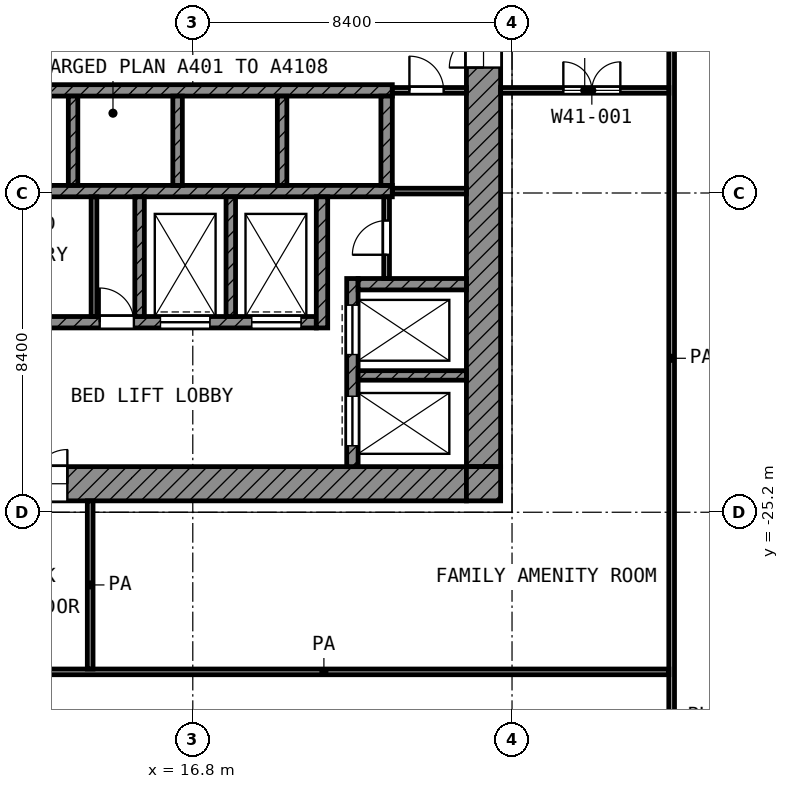
"""IFC4 building model, lengths in metres.
Left out: names, types, materials, properties, quantities, classifications, styles, units other than length and angle.
Written with IfcOpenShell. Run it as: python <this file> out.ifc"""

import sys

from ifc_helpers import new_model, si_unit, direction, frame, frame_2d, origin, place, context, subcontext, project, spatial, rectangle, extrude, element, fill, save


model = new_model("IFC4")
c1 = context("Model", 3, precision=1e-05, world=origin(), true_north=direction((0.0, 1.0)))
c2 = subcontext(c1, "Body", "Model", "MODEL_VIEW")
j1 = project(units=[si_unit("LENGTHUNIT", "METRE"), si_unit("PLANEANGLEUNIT", "RADIAN")], contexts=[c1])
p1 = place(None, origin())
s1 = spatial("IfcSite", under=j1, at=p1, CompositionType="ELEMENT")
p2 = place(p1, origin())
s2 = spatial("IfcBuilding", under=s1, at=p2, CompositionType="ELEMENT")
p3 = place(p2, frame((0.0, 0.0, 179.4)))
s3 = spatial("IfcBuildingStorey", under=s2, at=p3, CompositionType="ELEMENT", Elevation=179.4)
p4 = place(p3, frame((24.45, -24.0, 0.0), z_axis=(0.0, 0.0, 1.0), x_axis=(0.0, 1.0, 0.0)))
e1 = element("IfcWall", 1, at=p4, inside=s3, PredefinedType="SHEAR", context=c2, shape_type="SweptSolid", body=[
    extrude(rectangle(XDim=18.6, YDim=0.9, at=frame_2d((9.3, 0.0))), origin(), (0.0, 0.0, 1.0), 3.6),
])
p5 = place(p4, frame((10.5, 0.0, 0.0)))
e2 = element("IfcOpeningElement", 2, at=p5, cuts=e1, PredefinedType="OPENING", context=c2, shape_type="SweptSolid", body=[
    extrude(rectangle(XDim=1.8, YDim=2.1, at=frame_2d((0.9, 1.05))), frame((0.0, 0.46, 0.0), z_axis=(0.0, -1.0, 0.0), x_axis=(1.0, 0.0, 0.0)), (0.0, 0.0, 1.0), 0.92),
])
p6 = place(p3, frame((5.4, -24.45, 0.0), z_axis=(0.0, 0.0, 1.0), x_axis=(1.0, 0.0, 0.0)))
e3 = element("IfcWall", 3, at=p6, inside=s3, PredefinedType="SHEAR", context=c2, shape_type="SweptSolid", body=[
    extrude(rectangle(XDim=18.6, YDim=0.9, at=frame_2d((9.3, 0.0))), origin(), (0.0, 0.0, 1.0), 3.6),
])
p7 = place(p6, frame((6.3, 0.0, 0.0)))
e4 = element("IfcOpeningElement", 4, at=p7, cuts=e3, PredefinedType="OPENING", context=c2, shape_type="SweptSolid", body=[
    extrude(rectangle(XDim=1.8, YDim=2.1, at=frame_2d((0.9, 1.05))), frame((0.0, 0.46, 0.0), z_axis=(0.0, -1.0, 0.0), x_axis=(1.0, 0.0, 0.0)), (0.0, 0.0, 1.0), 0.92),
])
p8 = place(p3, frame((24.45, -24.9, 0.0), z_axis=(0.0, 0.0, 1.0), x_axis=(0.0, 1.0, 0.0)))
e5 = element("IfcWall", 5, at=p8, inside=s3, PredefinedType="SHEAR", context=c2, shape_type="SweptSolid", body=[
    extrude(rectangle(XDim=0.9, YDim=0.9, at=frame_2d((0.45, 0.0))), origin(), (0.0, 0.0, 1.0), 3.6),
])
p9 = place(p3, frame((5.4, -14.1, 0.0), z_axis=(0.0, 0.0, 1.0), x_axis=(1.0, 0.0, 0.0)))
e6 = element("IfcWall", 6, at=p9, inside=s3, PredefinedType="SHEAR", context=c2, shape_type="SweptSolid", body=[
    extrude(rectangle(XDim=16.65, YDim=0.3, at=frame_2d((8.325, 0.0))), origin(), (0.0, 0.0, 1.0), 3.6),
])
p10 = place(p9, frame((0.825, 0.0, 0.0)))
e7 = element("IfcOpeningElement", 7, at=p10, cuts=e6, PredefinedType="OPENING", context=c2, shape_type="SweptSolid", body=[
    extrude(rectangle(XDim=1.1, YDim=2.1, at=frame_2d((0.55, 1.05))), frame((0.0, 0.16, 0.0), z_axis=(0.0, -1.0, 0.0), x_axis=(1.0, 0.0, 0.0)), (0.0, 0.0, 1.0), 0.32),
])
p11 = place(p9, frame((3.575, 0.0, 0.0)))
e8 = element("IfcOpeningElement", 8, at=p11, cuts=e6, PredefinedType="OPENING", context=c2, shape_type="SweptSolid", body=[
    extrude(rectangle(XDim=1.1, YDim=2.1, at=frame_2d((0.55, 1.05))), frame((0.0, 0.16, 0.0), z_axis=(0.0, -1.0, 0.0), x_axis=(1.0, 0.0, 0.0)), (0.0, 0.0, 1.0), 0.32),
])
p12 = place(p3, frame((5.4, -16.75, 0.0), z_axis=(0.0, 0.0, 1.0), x_axis=(1.0, 0.0, 0.0)))
e9 = element("IfcWall", 9, at=p12, inside=s3, PredefinedType="SHEAR", context=c2, shape_type="SweptSolid", body=[
    extrude(rectangle(XDim=16.65, YDim=0.3, at=frame_2d((8.325, 0.0))), origin(), (0.0, 0.0, 1.0), 3.6),
])
p13 = place(p3, frame((5.4, -20.2, 0.0), z_axis=(0.0, 0.0, 1.0), x_axis=(1.0, 0.0, 0.0)))
e10 = element("IfcWall", 10, at=p13, inside=s3, PredefinedType="SHEAR", context=c2, shape_type="SweptSolid", body=[
    extrude(rectangle(XDim=14.65, YDim=0.3, at=frame_2d((7.325, 0.0))), origin(), (0.0, 0.0, 1.0), 3.6),
])
p14 = place(p13, frame((10.55, 0.0, 0.0)))
e11 = element("IfcOpeningElement", 11, at=p14, cuts=e10, PredefinedType="OPENING", context=c2, shape_type="SweptSolid", body=[
    extrude(rectangle(XDim=1.3, YDim=2.1, at=frame_2d((0.65, 1.05))), frame((0.0, 0.16, 0.0), z_axis=(0.0, -1.0, 0.0), x_axis=(1.0, 0.0, 0.0)), (0.0, 0.0, 1.0), 0.32),
])
p15 = place(p13, frame((12.95, 0.0, 0.0)))
e12 = element("IfcOpeningElement", 12, at=p15, cuts=e10, PredefinedType="OPENING", context=c2, shape_type="SweptSolid", body=[
    extrude(rectangle(XDim=1.3, YDim=2.1, at=frame_2d((0.65, 1.05))), frame((0.0, 0.16, 0.0), z_axis=(0.0, -1.0, 0.0), x_axis=(1.0, 0.0, 0.0)), (0.0, 0.0, 1.0), 0.32),
])
p16 = place(p13, frame((0.55, 0.0, 0.0)))
e13 = element("IfcOpeningElement", 13, at=p16, cuts=e10, PredefinedType="OPENING", context=c2, shape_type="SweptSolid", body=[
    extrude(rectangle(XDim=1.3, YDim=2.1, at=frame_2d((0.65, 1.05))), frame((0.0, 0.16, 0.0), z_axis=(0.0, -1.0, 0.0), x_axis=(1.0, 0.0, 0.0)), (0.0, 0.0, 1.0), 0.32),
])
p17 = place(p13, frame((2.95, 0.0, 0.0)))
e14 = element("IfcOpeningElement", 14, at=p17, cuts=e10, PredefinedType="OPENING", context=c2, shape_type="SweptSolid", body=[
    extrude(rectangle(XDim=1.3, YDim=2.1, at=frame_2d((0.65, 1.05))), frame((0.0, 0.16, 0.0), z_axis=(0.0, -1.0, 0.0), x_axis=(1.0, 0.0, 0.0)), (0.0, 0.0, 1.0), 0.32),
])
p18 = place(p13, frame((6.55, 0.0, 0.0)))
e15 = element("IfcOpeningElement", 15, at=p18, cuts=e10, PredefinedType="OPENING", context=c2, shape_type="SweptSolid", body=[
    extrude(rectangle(XDim=0.9, YDim=2.1, at=frame_2d((0.45, 1.05))), frame((0.0, 0.16, 0.0), z_axis=(0.0, -1.0, 0.0), x_axis=(1.0, 0.0, 0.0)), (0.0, 0.0, 1.0), 0.32),
])
p19 = place(p13, frame((8.95, 0.0, 0.0)))
e16 = element("IfcOpeningElement", 16, at=p19, cuts=e10, PredefinedType="OPENING", context=c2, shape_type="SweptSolid", body=[
    extrude(rectangle(XDim=0.9, YDim=2.1, at=frame_2d((0.45, 1.05))), frame((0.0, 0.16, 0.0), z_axis=(0.0, -1.0, 0.0), x_axis=(1.0, 0.0, 0.0)), (0.0, 0.0, 1.0), 0.32),
])
p20 = place(p3, frame((20.2, -20.35, 0.0), z_axis=(0.0, 0.0, 1.0), x_axis=(0.0, 1.0, 0.0)))
e17 = element("IfcWall", 17, at=p20, inside=s3, PredefinedType="SHEAR", context=c2, shape_type="SweptSolid", body=[
    extrude(rectangle(XDim=3.45, YDim=0.3, at=frame_2d((1.725, 0.0))), origin(), (0.0, 0.0, 1.0), 3.6),
])
p21 = place(p3, frame((21.9, -16.6, 0.0), z_axis=(0.0, 0.0, 1.0), x_axis=(0.0, 1.0, 0.0)))
e18 = element("IfcWall", 18, at=p21, inside=s3, PredefinedType="SHEAR", context=c2, shape_type="SweptSolid", body=[
    extrude(rectangle(XDim=2.35, YDim=0.3, at=frame_2d((1.175, 0.0))), origin(), (0.0, 0.0, 1.0), 3.6),
])
p22 = place(p3, frame((21.15, -19.2, 0.0), z_axis=(0.0, 0.0, 1.0), x_axis=(1.0, 0.0, 0.0)))
e19 = element("IfcWall", 19, at=p22, inside=s3, PredefinedType="SHEAR", context=c2, shape_type="SweptSolid", body=[
    extrude(rectangle(XDim=2.85, YDim=0.3, at=frame_2d((1.425, 0.0))), origin(), (0.0, 0.0, 1.0), 3.6),
])
p23 = place(p3, frame((21.0, -24.0, 0.0), z_axis=(0.0, 0.0, 1.0), x_axis=(0.0, 1.0, 0.0)))
e20 = element("IfcWall", 20, at=p23, inside=s3, PredefinedType="SHEAR", context=c2, shape_type="SweptSolid", body=[
    extrude(rectangle(XDim=4.95, YDim=0.3, at=frame_2d((2.475, 0.0))), origin(), (0.0, 0.0, 1.0), 3.6),
])
p24 = place(p23, frame((2.95, 0.0, 0.0)))
e21 = element("IfcOpeningElement", 21, at=p24, cuts=e20, PredefinedType="OPENING", context=c2, shape_type="SweptSolid", body=[
    extrude(rectangle(XDim=1.3, YDim=2.1, at=frame_2d((0.65, 1.05))), frame((0.0, 0.16, 0.0), z_axis=(0.0, -1.0, 0.0), x_axis=(1.0, 0.0, 0.0)), (0.0, 0.0, 1.0), 0.32),
])
p25 = place(p23, frame((0.55, 0.0, 0.0)))
e22 = element("IfcOpeningElement", 22, at=p25, cuts=e20, PredefinedType="OPENING", context=c2, shape_type="SweptSolid", body=[
    extrude(rectangle(XDim=1.3, YDim=2.1, at=frame_2d((0.65, 1.05))), frame((0.0, 0.16, 0.0), z_axis=(0.0, -1.0, 0.0), x_axis=(1.0, 0.0, 0.0)), (0.0, 0.0, 1.0), 0.32),
])
p26 = place(p3, frame((21.15, -21.6, 0.0), z_axis=(0.0, 0.0, 1.0), x_axis=(1.0, 0.0, 0.0)))
e23 = element("IfcWall", 23, at=p26, inside=s3, PredefinedType="SHEAR", context=c2, shape_type="SweptSolid", body=[
    extrude(rectangle(XDim=2.85, YDim=0.25, at=frame_2d((1.425, 0.0))), origin(), (0.0, 0.0, 1.0), 3.6),
])
for number, where, z_axis, x_axis in (
    (24, (15.4, -20.05, 0.0), (0.0, 0.0, 1.0), (0.0, 1.0, 0.0)),
    (25, (17.8, -20.05, 0.0), (0.0, 0.0, 1.0), (0.0, 1.0, 0.0)),
):
    element("IfcWall", number, at=place(p3, frame(where, z_axis=z_axis, x_axis=x_axis)), inside=s3, PredefinedType="SHEAR", context=c2, shape_type="SweptSolid", body=[
        extrude(rectangle(XDim=3.15, YDim=0.25, at=frame_2d((1.575, 0.0))), origin(), (0.0, 0.0, 1.0), 3.6),
    ])
for number, where, z_axis, x_axis in (
    (26, (13.65, -16.6, 0.0), (0.0, 0.0, 1.0), (0.0, 1.0, 0.0)),
    (27, (16.4, -16.6, 0.0), (0.0, 0.0, 1.0), (0.0, 1.0, 0.0)),
    (28, (19.15, -16.6, 0.0), (0.0, 0.0, 1.0), (0.0, 1.0, 0.0)),
):
    element("IfcWall", number, at=place(p3, frame(where, z_axis=z_axis, x_axis=x_axis)), inside=s3, PredefinedType="SHEAR", context=c2, shape_type="SweptSolid", body=[
        extrude(rectangle(XDim=2.35, YDim=0.25, at=frame_2d((1.175, 0.0))), origin(), (0.0, 0.0, 1.0), 3.6),
    ])
p27 = place(p3, frame((21.9, -19.05, 0.0), z_axis=(0.0, 0.0, 1.0), x_axis=(0.0, 1.0, 0.0)))
e29 = element("IfcWall", 29, at=p27, inside=s3, PredefinedType="PARTITIONING", context=c2, shape_type="SweptSolid", body=[
    extrude(rectangle(XDim=2.15, YDim=0.15, at=frame_2d((1.075, 0.0))), origin(), (0.0, 0.0, 1.0), 3.6),
])
p28 = place(p27, frame((0.625, 0.0, 0.0)))
e30 = element("IfcOpeningElement", 30, at=p28, cuts=e29, PredefinedType="OPENING", context=c2, shape_type="SweptSolid", body=[
    extrude(rectangle(XDim=0.9, YDim=2.1, at=frame_2d((0.45, 1.05))), frame((0.0, 0.085, 0.0), z_axis=(0.0, -1.0, 0.0), x_axis=(1.0, 0.0, 0.0)), (0.0, 0.0, 1.0), 0.17),
])
p29 = place(p3, frame((22.05, -16.75, 0.0), z_axis=(0.0, 0.0, 1.0), x_axis=(1.0, 0.0, 0.0)))
e31 = element("IfcWall", 31, at=p29, inside=s3, PredefinedType="PARTITIONING", context=c2, shape_type="SweptSolid", body=[
    extrude(rectangle(XDim=1.95, YDim=0.15, at=frame_2d((0.975, 0.0))), origin(), (0.0, 0.0, 1.0), 3.6),
])
p30 = place(p3, frame((22.05, -14.1, 0.0), z_axis=(0.0, 0.0, 1.0), x_axis=(1.0, 0.0, 0.0)))
e32 = element("IfcWall", 32, at=p30, inside=s3, PredefinedType="PARTITIONING", context=c2, shape_type="SweptSolid", body=[
    extrude(rectangle(XDim=1.95, YDim=0.15, at=frame_2d((0.975, 0.0))), origin(), (0.0, 0.0, 1.0), 3.6),
])
p31 = place(p30, frame((0.45, 0.0, 0.0)))
e33 = element("IfcOpeningElement", 33, at=p31, cuts=e32, PredefinedType="OPENING", context=c2, shape_type="SweptSolid", body=[
    extrude(rectangle(XDim=0.9, YDim=2.1, at=frame_2d((0.45, 1.05))), frame((0.0, 0.085, 0.0), z_axis=(0.0, -1.0, 0.0), x_axis=(1.0, 0.0, 0.0)), (0.0, 0.0, 1.0), 0.17),
])
p32 = place(p3, frame((14.2, -20.05, 0.0), z_axis=(0.0, 0.0, 1.0), x_axis=(0.0, 1.0, 0.0)))
e34 = element("IfcWall", 34, at=p32, inside=s3, PredefinedType="PARTITIONING", context=c2, shape_type="SweptSolid", body=[
    extrude(rectangle(XDim=3.15, YDim=0.15, at=frame_2d((1.575, 0.0))), origin(), (0.0, 0.0, 1.0), 3.6),
])
p33 = place(p3, frame((11.175, -29.4, 0.0), z_axis=(0.0, 0.0, 1.0), x_axis=(1.0, 0.0, 0.0)))
e35 = element("IfcWall", 35, at=p33, inside=s3, PredefinedType="PARTITIONING", context=c2, shape_type="SweptSolid", body=[
    extrude(rectangle(XDim=18.15, YDim=0.15, at=frame_2d((9.075, 0.0))), origin(), (0.0, 0.0, 1.0), 3.6),
])
p34 = place(p3, frame((24.9, -14.1, 0.0), z_axis=(0.0, 0.0, 1.0), x_axis=(1.0, 0.0, 0.0)))
e36 = element("IfcWall", 36, at=p34, inside=s3, PredefinedType="PARTITIONING", context=c2, shape_type="SweptSolid", body=[
    extrude(rectangle(XDim=4.425, YDim=0.15, at=frame_2d((2.212, 0.0))), origin(), (0.0, 0.0, 1.0), 3.6),
])
p35 = place(p34, frame((1.65, 0.0, 0.0)))
e37 = element("IfcOpeningElement", 37, at=p35, cuts=e36, PredefinedType="OPENING", context=c2, shape_type="SweptSolid", body=[
    extrude(rectangle(XDim=1.5, YDim=2.1, at=frame_2d((0.75, 1.05))), frame((0.0, 0.085, 0.0), z_axis=(0.0, -1.0, 0.0), x_axis=(1.0, 0.0, 0.0)), (0.0, 0.0, 1.0), 0.17),
])
p36 = place(p3, frame((14.1, -29.325, 0.0), z_axis=(0.0, 0.0, 1.0), x_axis=(0.0, 1.0, 0.0)))
e38 = element("IfcWall", 38, at=p36, inside=s3, PredefinedType="PARTITIONING", context=c2, shape_type="SweptSolid", body=[
    extrude(rectangle(XDim=4.425, YDim=0.15, at=frame_2d((2.212, 0.0))), origin(), (0.0, 0.0, 1.0), 3.6),
])
p37 = place(p3, frame((29.4, -31.198, 0.0), z_axis=(0.0, 0.0, 1.0), x_axis=(0.0, 1.0, 0.0)))
e39 = element("IfcWall", 39, at=p37, inside=s3, PredefinedType="PARTITIONING", context=c2, shape_type="SweptSolid", body=[
    extrude(rectangle(XDim=20.098, YDim=0.15, at=frame_2d((10.049, 0.0))), origin(), (0.0, 0.0, 1.0), 3.6),
])
p38 = place(p24, origin())
e40 = element("IfcDoor", 40, at=p38, inside=s3, OperationType="DOUBLE_DOOR_SLIDING", PredefinedType="DOOR", context=c2, shape_type="SweptSolid", body=[
    extrude(rectangle(XDim=1.3, YDim=2.1, at=frame_2d((0.65, 1.05))), frame((0.0, 0.025, 0.0), z_axis=(0.0, -1.0, 0.0), x_axis=(1.0, 0.0, 0.0)), (0.0, 0.0, 1.0), 0.05),
])
fill(e21, e40)
p39 = place(p25, origin())
e41 = element("IfcDoor", 41, at=p39, inside=s3, OperationType="DOUBLE_DOOR_SLIDING", PredefinedType="DOOR", context=c2, shape_type="SweptSolid", body=[
    extrude(rectangle(XDim=1.3, YDim=2.1, at=frame_2d((0.65, 1.05))), frame((0.0, 0.025, 0.0), z_axis=(0.0, -1.0, 0.0), x_axis=(1.0, 0.0, 0.0)), (0.0, 0.0, 1.0), 0.05),
])
fill(e22, e41)
p40 = place(p14, origin())
e42 = element("IfcDoor", 42, at=p40, inside=s3, OperationType="DOUBLE_DOOR_SLIDING", PredefinedType="DOOR", context=c2, shape_type="SweptSolid", body=[
    extrude(rectangle(XDim=1.3, YDim=2.1, at=frame_2d((0.65, 1.05))), frame((0.0, 0.025, 0.0), z_axis=(0.0, -1.0, 0.0), x_axis=(1.0, 0.0, 0.0)), (0.0, 0.0, 1.0), 0.05),
])
fill(e11, e42)
p41 = place(p15, origin())
e43 = element("IfcDoor", 43, at=p41, inside=s3, OperationType="DOUBLE_DOOR_SLIDING", PredefinedType="DOOR", context=c2, shape_type="SweptSolid", body=[
    extrude(rectangle(XDim=1.3, YDim=2.1, at=frame_2d((0.65, 1.05))), frame((0.0, 0.025, 0.0), z_axis=(0.0, -1.0, 0.0), x_axis=(1.0, 0.0, 0.0)), (0.0, 0.0, 1.0), 0.05),
])
fill(e12, e43)
p42 = place(p5, origin())
e44 = element("IfcDoor", 44, at=p42, inside=s3, OperationType="DOUBLE_DOOR_SINGLE_SWING", PredefinedType="DOOR", context=c2, shape_type="SweptSolid", body=[
    extrude(rectangle(XDim=1.8, YDim=2.1, at=frame_2d((0.9, 1.05))), frame((0.0, 0.025, 0.0), z_axis=(0.0, -1.0, 0.0), x_axis=(1.0, 0.0, 0.0)), (0.0, 0.0, 1.0), 0.05),
])
fill(e2, e44)
p43 = place(p7, origin())
e45 = element("IfcDoor", 45, at=p43, inside=s3, OperationType="DOUBLE_DOOR_SINGLE_SWING", PredefinedType="DOOR", context=c2, shape_type="SweptSolid", body=[
    extrude(rectangle(XDim=1.8, YDim=2.1, at=frame_2d((0.9, 1.05))), frame((0.0, 0.025, 0.0), z_axis=(0.0, -1.0, 0.0), x_axis=(1.0, 0.0, 0.0)), (0.0, 0.0, 1.0), 0.05),
])
fill(e4, e45)
p44 = place(p31, origin())
e46 = element("IfcDoor", 46, at=p44, inside=s3, OperationType="SINGLE_SWING_LEFT", PredefinedType="DOOR", context=c2, shape_type="SweptSolid", body=[
    extrude(rectangle(XDim=0.9, YDim=2.1, at=frame_2d((0.45, 1.05))), frame((0.0, 0.025, 0.0), z_axis=(0.0, -1.0, 0.0), x_axis=(1.0, 0.0, 0.0)), (0.0, 0.0, 1.0), 0.05),
])
fill(e33, e46)
p45 = place(p28, origin())
e47 = element("IfcDoor", 47, at=p45, inside=s3, OperationType="SINGLE_SWING_LEFT", PredefinedType="DOOR", context=c2, shape_type="SweptSolid", body=[
    extrude(rectangle(XDim=0.9, YDim=2.1, at=frame_2d((0.45, 1.05))), frame((0.0, 0.025, 0.0), z_axis=(0.0, -1.0, 0.0), x_axis=(1.0, 0.0, 0.0)), (0.0, 0.0, 1.0), 0.05),
])
fill(e30, e47)
p46 = place(p19, origin())
e48 = element("IfcDoor", 48, at=p46, inside=s3, OperationType="SINGLE_SWING_LEFT", PredefinedType="DOOR", context=c2, shape_type="SweptSolid", body=[
    extrude(rectangle(XDim=0.9, YDim=2.1, at=frame_2d((0.45, 1.05))), frame((0.0, 0.025, 0.0), z_axis=(0.0, -1.0, 0.0), x_axis=(1.0, 0.0, 0.0)), (0.0, 0.0, 1.0), 0.05),
])
fill(e16, e48)
p47 = place(p35, origin())
e49 = element("IfcDoor", 49, at=p47, inside=s3, OperationType="DOUBLE_DOOR_SINGLE_SWING", PredefinedType="DOOR", context=c2, shape_type="SweptSolid", body=[
    extrude(rectangle(XDim=1.5, YDim=2.1, at=frame_2d((0.75, 1.05))), frame((0.0, 0.025, 0.0), z_axis=(0.0, -1.0, 0.0), x_axis=(1.0, 0.0, 0.0)), (0.0, 0.0, 1.0), 0.05),
])
fill(e37, e49)
save(model, sys.argv[1])
